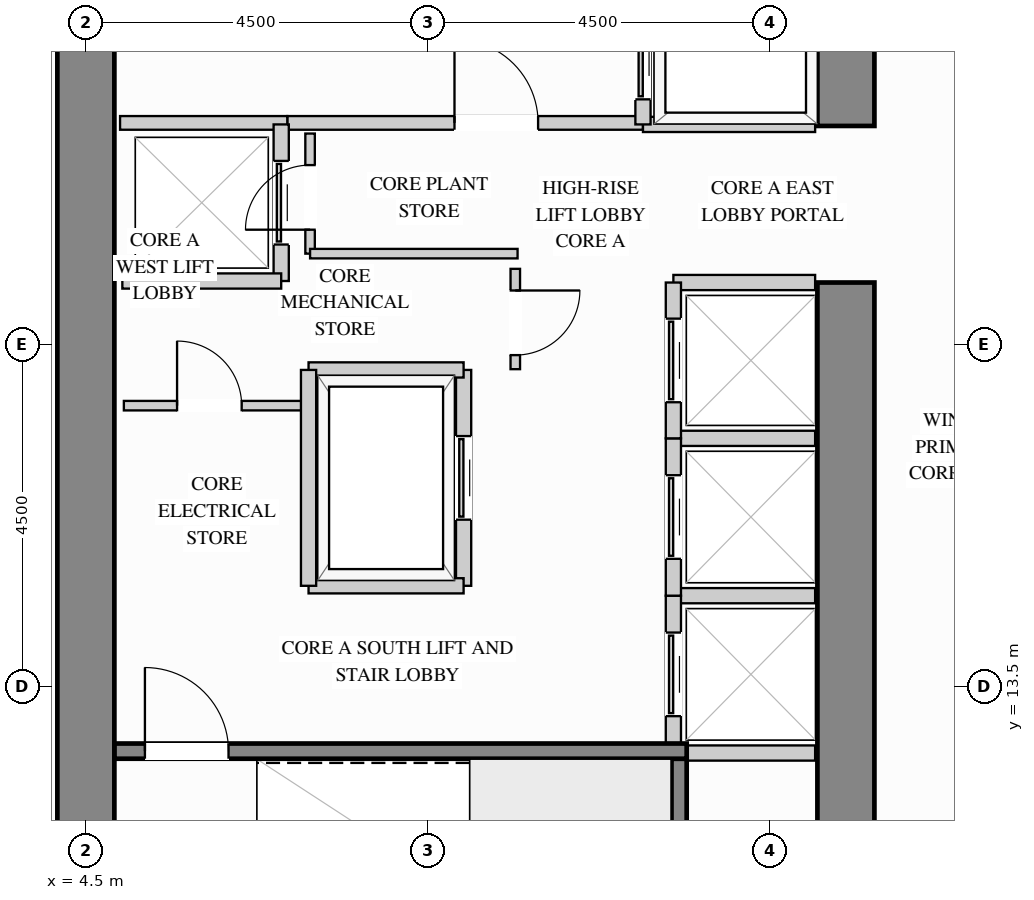
"""IFC4 building model, lengths in metres.
Left out: names, types, materials, properties, quantities, classifications, styles, units other than length and angle.
Written with IfcOpenShell. Run it as: python <this file> out.ifc"""

import sys

from ifc_helpers import new_model, si_unit, direction, frame, frame_2d, origin, place, context, subcontext, project, spatial, rectangle, extrude, source, transform, mapped, element, fill, save


model = new_model("IFC4")
c1 = context("Model", 3, precision=1e-05, world=origin(), true_north=direction((0.0, 1.0)))
c2 = subcontext(c1, "Body", "Model", "MODEL_VIEW")
j1 = project(units=[si_unit("LENGTHUNIT", "METRE"), si_unit("PLANEANGLEUNIT", "RADIAN")], contexts=[c1])
p1 = place(None, origin())
s1 = spatial("IfcSite", under=j1, at=p1, CompositionType="ELEMENT")
p2 = place(p1, origin())
s2 = spatial("IfcBuilding", under=s1, at=p2, CompositionType="ELEMENT")
p3 = place(p2, frame((0.0, 0.0, 88.2)))
s3 = spatial("IfcBuildingStorey", under=s2, at=p3, CompositionType="ELEMENT", Elevation=88.2)
m1 = source(origin(), c2, "Body", "SweptSolid", [
    extrude(rectangle(XDim=9.945, YDim=0.75, at=frame_2d((4.973, 0.0))), origin(), (0.0, 0.0, 1.0), 3.38),
])
p4 = place(p3, frame((14.5, 8.875, 0.0), z_axis=(0.0, 0.0, 1.0), x_axis=(0.0, 1.0, 0.0)))
e1 = element("IfcWall", 1, at=p4, inside=s3, PredefinedType="SHEAR", context=c2, shape_type="MappedRepresentation", body=[
    mapped(m1, transform((0.0, 0.0, 0.0), x_axis=(1.0, 0.0, 0.0), y_axis=(0.0, 1.0, 0.0), z_axis=(0.0, 0.0, 1.0))),
])
m2 = source(origin(), c2, "Body", "SweptSolid", [
    extrude(rectangle(XDim=8.245, YDim=0.75, at=frame_2d((4.123, 0.0))), origin(), (0.0, 0.0, 1.0), 3.38),
])
p5 = place(p3, frame((14.5, 20.88, 0.0), z_axis=(0.0, 0.0, 1.0), x_axis=(0.0, 1.0, 0.0)))
e2 = element("IfcWall", 2, at=p5, inside=s3, PredefinedType="SHEAR", context=c2, shape_type="MappedRepresentation", body=[
    mapped(m2, transform((0.0, 0.0, 0.0), x_axis=(1.0, 0.0, 0.0), y_axis=(0.0, 1.0, 0.0), z_axis=(0.0, 0.0, 1.0))),
])
m3 = source(origin(), c2, "Body", "SweptSolid", [
    extrude(rectangle(XDim=20.25, YDim=0.75, at=frame_2d((10.125, 0.0))), origin(), (0.0, 0.0, 1.0), 3.38),
])
p6 = place(p3, frame((4.5, 8.875, 0.0), z_axis=(0.0, 0.0, 1.0), x_axis=(0.0, 1.0, 0.0)))
e3 = element("IfcWall", 3, at=p6, inside=s3, PredefinedType="SHEAR", context=c2, shape_type="MappedRepresentation", body=[
    mapped(m3, transform((0.0, 0.0, 0.0), x_axis=(1.0, 0.0, 0.0), y_axis=(0.0, 1.0, 0.0), z_axis=(0.0, 0.0, 1.0))),
])
p7 = place(p3, frame((7.15, 20.92, 0.0), z_axis=(0.0, 0.0, 1.0), x_axis=(1.0, 0.0, 0.0)))
e4 = element("IfcWall", 4, at=p7, inside=s3, PredefinedType="PARTITIONING", context=c2, shape_type="SweptSolid", body=[
    extrude(rectangle(XDim=4.68, YDim=0.18, at=frame_2d((2.34, 0.0))), origin(), (0.0, 0.0, 1.0), 3.365),
])
p8 = place(p7, frame((2.2, 0.0, 0.0)))
e5 = element("IfcOpeningElement", 5, at=p8, cuts=e4, PredefinedType="OPENING", context=c2, shape_type="SweptSolid", body=[
    extrude(rectangle(XDim=1.1, YDim=2.15, at=frame_2d((0.55, 1.075))), frame((0.0, 0.1, 0.0), z_axis=(0.0, -1.0, 0.0), x_axis=(1.0, 0.0, 0.0)), (0.0, 0.0, 1.0), 0.2),
])
m4 = source(origin(), c2, "Body", "SweptSolid", [
    extrude(rectangle(XDim=2.2, YDim=0.18, at=frame_2d((1.1, 0.0))), origin(), (0.0, 0.0, 1.0), 3.365),
])
p9 = place(p3, frame((4.95, 20.92, 0.0), z_axis=(0.0, 0.0, 1.0), x_axis=(1.0, 0.0, 0.0)))
e6 = element("IfcWall", 6, at=p9, inside=s3, PredefinedType="PARTITIONING", context=c2, shape_type="MappedRepresentation", body=[
    mapped(m4, transform((0.0, 0.0, 0.0), x_axis=(1.0, 0.0, 0.0), y_axis=(0.0, 1.0, 0.0), z_axis=(0.0, 0.0, 1.0))),
])
p10 = place(p3, frame((10.15, 17.68, 0.0), z_axis=(0.0, 0.0, 1.0), x_axis=(0.0, 1.0, 0.0)))
e7 = element("IfcWall", 7, at=p10, inside=s3, PredefinedType="PARTITIONING", context=c2, shape_type="SweptSolid", body=[
    extrude(rectangle(XDim=1.32, YDim=0.125, at=frame_2d((0.66, 0.0))), origin(), (0.0, 0.0, 1.0), 3.365),
])
p11 = place(p10, frame((0.185, 0.0, 0.0)))
e8 = element("IfcOpeningElement", 8, at=p11, cuts=e7, PredefinedType="OPENING", context=c2, shape_type="SweptSolid", body=[
    extrude(rectangle(XDim=0.85, YDim=2.1, at=frame_2d((0.425, 1.05))), frame((0.0, 0.073, 0.0), z_axis=(0.0, -1.0, 0.0), x_axis=(1.0, 0.0, 0.0)), (0.0, 0.0, 1.0), 0.145),
])
p12 = place(p3, frame((7.45, 19.2, 0.0), z_axis=(0.0, 0.0, 1.0), x_axis=(0.0, 1.0, 0.0)))
e9 = element("IfcWall", 9, at=p12, inside=s3, PredefinedType="PARTITIONING", context=c2, shape_type="SweptSolid", body=[
    extrude(rectangle(XDim=1.58, YDim=0.125, at=frame_2d((0.79, 0.0))), origin(), (0.0, 0.0, 1.0), 3.365),
])
p13 = place(p12, frame((0.315, 0.0, 0.0)))
e10 = element("IfcOpeningElement", 10, at=p13, cuts=e9, PredefinedType="OPENING", context=c2, shape_type="SweptSolid", body=[
    extrude(rectangle(XDim=0.85, YDim=2.1, at=frame_2d((0.425, 1.05))), frame((0.0, 0.073, 0.0), z_axis=(0.0, -1.0, 0.0), x_axis=(1.0, 0.0, 0.0)), (0.0, 0.0, 1.0), 0.145),
])
m5 = source(origin(), c2, "Body", "SweptSolid", [
    extrude(rectangle(XDim=2.73, YDim=0.125, at=frame_2d((1.365, 0.0))), origin(), (0.0, 0.0, 1.0), 3.365),
])
p14 = place(p3, frame((7.45, 19.2, 0.0), z_axis=(0.0, 0.0, 1.0), x_axis=(1.0, 0.0, 0.0)))
e11 = element("IfcWall", 11, at=p14, inside=s3, PredefinedType="PARTITIONING", context=c2, shape_type="MappedRepresentation", body=[
    mapped(m5, transform((0.0, 0.0, 0.0), x_axis=(1.0, 0.0, 0.0), y_axis=(0.0, 1.0, 0.0), z_axis=(0.0, 0.0, 1.0))),
])
p15 = place(p3, frame((5.0, 17.2, 0.0), z_axis=(0.0, 0.0, 1.0), x_axis=(1.0, 0.0, 0.0)))
e12 = element("IfcWall", 12, at=p15, inside=s3, PredefinedType="PARTITIONING", context=c2, shape_type="SweptSolid", body=[
    extrude(rectangle(XDim=2.4, YDim=0.125, at=frame_2d((1.2, 0.0))), origin(), (0.0, 0.0, 1.0), 3.365),
])
p16 = place(p15, frame((0.7, 0.0, 0.0)))
e13 = element("IfcOpeningElement", 13, at=p16, cuts=e12, PredefinedType="OPENING", context=c2, shape_type="SweptSolid", body=[
    extrude(rectangle(XDim=0.85, YDim=2.1, at=frame_2d((0.425, 1.05))), frame((0.0, 0.073, 0.0), z_axis=(0.0, -1.0, 0.0), x_axis=(1.0, 0.0, 0.0)), (0.0, 0.0, 1.0), 0.145),
])
m6 = source(origin(), c2, "Body", "SweptSolid", [
    extrude(rectangle(XDim=2.265, YDim=0.2, at=frame_2d((1.132, 0.0))), origin(), (0.0, 0.0, 1.0), 3.365),
])
p17 = place(p3, frame((11.83, 20.9, 0.0), z_axis=(0.0, 0.0, 1.0), x_axis=(1.0, 0.0, 0.0)))
e14 = element("IfcWall", 14, at=p17, inside=s3, PredefinedType="PARTITIONING", context=c2, shape_type="MappedRepresentation", body=[
    mapped(m6, transform((0.0, 0.0, 0.0), x_axis=(1.0, 0.0, 0.0), y_axis=(0.0, 1.0, 0.0), z_axis=(0.0, 0.0, 1.0))),
])
p18 = place(p3, frame((11.83, 20.9, 0.0), z_axis=(0.0, 0.0, 1.0), x_axis=(0.0, 1.0, 0.0)))
e15 = element("IfcWall", 15, at=p18, inside=s3, PredefinedType="PARTITIONING", context=c2, shape_type="SweptSolid", body=[
    extrude(rectangle(XDim=1.76, YDim=0.2, at=frame_2d((0.88, 0.0))), origin(), (0.0, 0.0, 1.0), 3.365),
])
p19 = place(p18, frame((0.33, 0.0, 0.0)))
e16 = element("IfcOpeningElement", 16, at=p19, cuts=e15, PredefinedType="OPENING", context=c2, shape_type="SweptSolid", body=[
    extrude(rectangle(XDim=1.1, YDim=2.2, at=frame_2d((0.55, 1.1))), frame((0.0, 0.11, 0.0), z_axis=(0.0, -1.0, 0.0), x_axis=(1.0, 0.0, 0.0)), (0.0, 0.0, 1.0), 0.22),
])
m7 = source(origin(), c2, "Body", "SweptSolid", [
    extrude(rectangle(XDim=1.865, YDim=0.2, at=frame_2d((0.933, 0.0))), origin(), (0.0, 0.0, 1.0), 3.365),
])
for number, where, z_axis, x_axis in (
    (17, (12.23, 14.7, 0.0), (0.0, 0.0, 1.0), (1.0, 0.0, 0.0)),
    (18, (12.23, 12.63, 0.0), (0.0, 0.0, 1.0), (1.0, 0.0, 0.0)),
):
    element("IfcWall", number, at=place(p3, frame(where, z_axis=z_axis, x_axis=x_axis)), inside=s3, PredefinedType="PARTITIONING", context=c2, shape_type="MappedRepresentation", body=[
        mapped(m7, transform((0.0, 0.0, 0.0), x_axis=(1.0, 0.0, 0.0), y_axis=(0.0, 1.0, 0.0), z_axis=(0.0, 0.0, 1.0))),
    ])
p20 = place(p3, frame((12.23, 12.63, 0.0), z_axis=(0.0, 0.0, 1.0), x_axis=(0.0, 1.0, 0.0)))
e19 = element("IfcWall", 19, at=p20, inside=s3, PredefinedType="PARTITIONING", context=c2, shape_type="SweptSolid", body=[
    extrude(rectangle(XDim=2.07, YDim=0.2, at=frame_2d((1.035, 0.0))), origin(), (0.0, 0.0, 1.0), 3.365),
])
p21 = place(p20, frame((0.485, 0.0, 0.0)))
e20 = element("IfcOpeningElement", 20, at=p21, cuts=e19, PredefinedType="OPENING", context=c2, shape_type="SweptSolid", body=[
    extrude(rectangle(XDim=1.1, YDim=2.2, at=frame_2d((0.55, 1.1))), frame((0.0, 0.11, 0.0), z_axis=(0.0, -1.0, 0.0), x_axis=(1.0, 0.0, 0.0)), (0.0, 0.0, 1.0), 0.22),
])
p22 = place(p3, frame((12.23, 16.77, 0.0), z_axis=(0.0, 0.0, 1.0), x_axis=(1.0, 0.0, 0.0)))
e21 = element("IfcWall", 21, at=p22, inside=s3, PredefinedType="PARTITIONING", context=c2, shape_type="MappedRepresentation", body=[
    mapped(m7, transform((0.0, 0.0, 0.0), x_axis=(1.0, 0.0, 0.0), y_axis=(0.0, 1.0, 0.0), z_axis=(0.0, 0.0, 1.0))),
])
p23 = place(p3, frame((12.23, 14.7, 0.0), z_axis=(0.0, 0.0, 1.0), x_axis=(0.0, 1.0, 0.0)))
e22 = element("IfcWall", 22, at=p23, inside=s3, PredefinedType="PARTITIONING", context=c2, shape_type="SweptSolid", body=[
    extrude(rectangle(XDim=2.07, YDim=0.2, at=frame_2d((1.035, 0.0))), origin(), (0.0, 0.0, 1.0), 3.365),
])
p24 = place(p23, frame((0.485, 0.0, 0.0)))
e23 = element("IfcOpeningElement", 23, at=p24, cuts=e22, PredefinedType="OPENING", context=c2, shape_type="SweptSolid", body=[
    extrude(rectangle(XDim=1.1, YDim=2.2, at=frame_2d((0.55, 1.1))), frame((0.0, 0.11, 0.0), z_axis=(0.0, -1.0, 0.0), x_axis=(1.0, 0.0, 0.0)), (0.0, 0.0, 1.0), 0.22),
])
p25 = place(p3, frame((12.23, 18.82, 0.0), z_axis=(0.0, 0.0, 1.0), x_axis=(1.0, 0.0, 0.0)))
e24 = element("IfcWall", 24, at=p25, inside=s3, PredefinedType="PARTITIONING", context=c2, shape_type="MappedRepresentation", body=[
    mapped(m7, transform((0.0, 0.0, 0.0), x_axis=(1.0, 0.0, 0.0), y_axis=(0.0, 1.0, 0.0), z_axis=(0.0, 0.0, 1.0))),
])
p26 = place(p3, frame((12.23, 16.77, 0.0), z_axis=(0.0, 0.0, 1.0), x_axis=(0.0, 1.0, 0.0)))
e25 = element("IfcWall", 25, at=p26, inside=s3, PredefinedType="PARTITIONING", context=c2, shape_type="SweptSolid", body=[
    extrude(rectangle(XDim=2.05, YDim=0.2, at=frame_2d((1.025, 0.0))), origin(), (0.0, 0.0, 1.0), 3.365),
])
p27 = place(p26, frame((0.475, 0.0, 0.0)))
e26 = element("IfcOpeningElement", 26, at=p27, cuts=e25, PredefinedType="OPENING", context=c2, shape_type="SweptSolid", body=[
    extrude(rectangle(XDim=1.1, YDim=2.2, at=frame_2d((0.55, 1.1))), frame((0.0, 0.11, 0.0), z_axis=(0.0, -1.0, 0.0), x_axis=(1.0, 0.0, 0.0)), (0.0, 0.0, 1.0), 0.22),
])
p28 = place(p3, frame((7.07, 18.84, 0.0), z_axis=(0.0, 0.0, 1.0), x_axis=(0.0, 1.0, 0.0)))
e27 = element("IfcWall", 27, at=p28, inside=s3, PredefinedType="PARTITIONING", context=c2, shape_type="SweptSolid", body=[
    extrude(rectangle(XDim=2.06, YDim=0.2, at=frame_2d((1.03, 0.0))), origin(), (0.0, 0.0, 1.0), 3.365),
])
p29 = place(p28, frame((0.48, 0.0, 0.0)))
e28 = element("IfcOpeningElement", 28, at=p29, cuts=e27, PredefinedType="OPENING", context=c2, shape_type="SweptSolid", body=[
    extrude(rectangle(XDim=1.1, YDim=2.2, at=frame_2d((0.55, 1.1))), frame((0.0, 0.11, 0.0), z_axis=(0.0, -1.0, 0.0), x_axis=(1.0, 0.0, 0.0)), (0.0, 0.0, 1.0), 0.22),
])
m8 = source(origin(), c2, "Body", "SweptSolid", [
    extrude(rectangle(XDim=2.09, YDim=0.2, at=frame_2d((1.045, 0.0))), origin(), (0.0, 0.0, 1.0), 3.365),
])
p30 = place(p3, frame((4.98, 18.84, 0.0), z_axis=(0.0, 0.0, 1.0), x_axis=(1.0, 0.0, 0.0)))
e29 = element("IfcWall", 29, at=p30, inside=s3, PredefinedType="PARTITIONING", context=c2, shape_type="MappedRepresentation", body=[
    mapped(m8, transform((0.0, 0.0, 0.0), x_axis=(1.0, 0.0, 0.0), y_axis=(0.0, 1.0, 0.0), z_axis=(0.0, 0.0, 1.0))),
])
p31 = place(p3, frame((9.47, 14.83, 0.0), z_axis=(0.0, 0.0, 1.0), x_axis=(0.0, 1.0, 0.0)))
e30 = element("IfcWall", 30, at=p31, inside=s3, PredefinedType="PARTITIONING", context=c2, shape_type="SweptSolid", body=[
    extrude(rectangle(XDim=2.84, YDim=0.2, at=frame_2d((1.42, 0.0))), origin(), (0.0, 0.0, 1.0), 3.365),
])
p32 = place(p31, frame((0.87, 0.0, 0.0)))
e31 = element("IfcOpeningElement", 31, at=p32, cuts=e30, PredefinedType="OPENING", context=c2, shape_type="SweptSolid", body=[
    extrude(rectangle(XDim=1.1, YDim=2.2, at=frame_2d((0.55, 1.1))), frame((0.0, 0.11, 0.0), z_axis=(0.0, -1.0, 0.0), x_axis=(1.0, 0.0, 0.0)), (0.0, 0.0, 1.0), 0.22),
])
m9 = source(origin(), c2, "Body", "SweptSolid", [
    extrude(rectangle(XDim=2.04, YDim=0.2, at=frame_2d((1.02, 0.0))), origin(), (0.0, 0.0, 1.0), 3.365),
])
for number, where, z_axis, x_axis in (
    (32, (7.43, 17.67, 0.0), (0.0, 0.0, 1.0), (1.0, 0.0, 0.0)),
    (33, (7.43, 14.83, 0.0), (0.0, 0.0, 1.0), (1.0, 0.0, 0.0)),
):
    element("IfcWall", number, at=place(p3, frame(where, z_axis=z_axis, x_axis=x_axis)), inside=s3, PredefinedType="PARTITIONING", context=c2, shape_type="MappedRepresentation", body=[
        mapped(m9, transform((0.0, 0.0, 0.0), x_axis=(1.0, 0.0, 0.0), y_axis=(0.0, 1.0, 0.0), z_axis=(0.0, 0.0, 1.0))),
    ])
m10 = source(origin(), c2, "Body", "SweptSolid", [
    extrude(rectangle(XDim=2.84, YDim=0.2, at=frame_2d((1.42, 0.0))), origin(), (0.0, 0.0, 1.0), 3.365),
])
p33 = place(p3, frame((7.43, 14.83, 0.0), z_axis=(0.0, 0.0, 1.0), x_axis=(0.0, 1.0, 0.0)))
e34 = element("IfcWall", 34, at=p33, inside=s3, PredefinedType="PARTITIONING", context=c2, shape_type="MappedRepresentation", body=[
    mapped(m10, transform((0.0, 0.0, 0.0), x_axis=(1.0, 0.0, 0.0), y_axis=(0.0, 1.0, 0.0), z_axis=(0.0, 0.0, 1.0))),
])
m11 = source(origin(), c2, "Body", "SweptSolid", [
    extrude(rectangle(XDim=3.678, YDim=0.2, at=frame_2d((1.839, 0.0))), origin(), (0.0, 0.0, 1.0), 3.38),
])
p34 = place(p3, frame((12.305, 8.877, 0.0), z_axis=(0.0, 0.0, 1.0), x_axis=(0.0, 1.0, 0.0)))
e35 = element("IfcWall", 35, at=p34, inside=s3, PredefinedType="SHEAR", context=c2, shape_type="MappedRepresentation", body=[
    mapped(m11, transform((0.0, 0.0, 0.0), x_axis=(1.0, 0.0, 0.0), y_axis=(0.0, 1.0, 0.0), z_axis=(0.0, 0.0, 1.0))),
])
p35 = place(p3, frame((4.877, 12.655, 0.0), z_axis=(0.0, 0.0, 1.0), x_axis=(1.0, 0.0, 0.0)))
e36 = element("IfcWall", 36, at=p35, inside=s3, PredefinedType="SHEAR", context=c2, shape_type="SweptSolid", body=[
    extrude(rectangle(XDim=7.528, YDim=0.2, at=frame_2d((3.764, 0.0))), origin(), (0.0, 0.0, 1.0), 3.38),
])
p36 = place(p35, frame((0.4, 0.0, 0.0)))
e37 = element("IfcOpeningElement", 37, at=p36, cuts=e36, PredefinedType="OPENING", context=c2, shape_type="SweptSolid", body=[
    extrude(rectangle(XDim=1.1, YDim=2.15, at=frame_2d((0.55, 1.075))), frame((0.0, 0.11, 0.0), z_axis=(0.0, -1.0, 0.0), x_axis=(1.0, 0.0, 0.0)), (0.0, 0.0, 1.0), 0.22),
])
m12 = source(origin(), c2, "Body", "SweptSolid", [
    extrude(rectangle(XDim=1.1, YDim=2.15, at=frame_2d((0.55, 1.075))), frame((0.0, 0.025, 0.0), z_axis=(0.0, -1.0, 0.0), x_axis=(1.0, 0.0, 0.0)), (0.0, 0.0, 1.0), 0.05),
])
p37 = place(p8, origin())
e38 = element("IfcDoor", 38, at=p37, inside=s3, OperationType="SINGLE_SWING_LEFT", PredefinedType="DOOR", context=c2, shape_type="MappedRepresentation", body=[
    mapped(m12, transform((0.0, 0.0, 0.0), x_axis=(1.0, 0.0, 0.0), y_axis=(0.0, 1.0, 0.0), z_axis=(0.0, 0.0, 1.0))),
])
fill(e5, e38)
m13 = source(origin(), c2, "Body", "SweptSolid", [
    extrude(rectangle(XDim=1.1, YDim=2.2, at=frame_2d((0.55, 1.1))), frame((0.0, 0.025, 0.0), z_axis=(0.0, -1.0, 0.0), x_axis=(1.0, 0.0, 0.0)), (0.0, 0.0, 1.0), 0.05),
])
p38 = place(p19, origin())
e39 = element("IfcDoor", 39, at=p38, inside=s3, OperationType="SLIDING_TO_LEFT", PredefinedType="DOOR", context=c2, shape_type="MappedRepresentation", body=[
    mapped(m13, transform((0.0, 0.0, 0.0), x_axis=(1.0, 0.0, 0.0), y_axis=(0.0, 1.0, 0.0), z_axis=(0.0, 0.0, 1.0))),
])
fill(e16, e39)
p39 = place(p21, origin())
e40 = element("IfcDoor", 40, at=p39, inside=s3, OperationType="SLIDING_TO_LEFT", PredefinedType="DOOR", context=c2, shape_type="MappedRepresentation", body=[
    mapped(m13, transform((0.0, 0.0, 0.0), x_axis=(1.0, 0.0, 0.0), y_axis=(0.0, 1.0, 0.0), z_axis=(0.0, 0.0, 1.0))),
])
fill(e20, e40)
p40 = place(p24, origin())
e41 = element("IfcDoor", 41, at=p40, inside=s3, OperationType="SLIDING_TO_LEFT", PredefinedType="DOOR", context=c2, shape_type="MappedRepresentation", body=[
    mapped(m13, transform((0.0, 0.0, 0.0), x_axis=(1.0, 0.0, 0.0), y_axis=(0.0, 1.0, 0.0), z_axis=(0.0, 0.0, 1.0))),
])
fill(e23, e41)
p41 = place(p27, origin())
e42 = element("IfcDoor", 42, at=p41, inside=s3, OperationType="SLIDING_TO_LEFT", PredefinedType="DOOR", context=c2, shape_type="MappedRepresentation", body=[
    mapped(m13, transform((0.0, 0.0, 0.0), x_axis=(1.0, 0.0, 0.0), y_axis=(0.0, 1.0, 0.0), z_axis=(0.0, 0.0, 1.0))),
])
fill(e26, e42)
p42 = place(p29, origin())
e43 = element("IfcDoor", 43, at=p42, inside=s3, OperationType="SLIDING_TO_LEFT", PredefinedType="DOOR", context=c2, shape_type="MappedRepresentation", body=[
    mapped(m13, transform((0.0, 0.0, 0.0), x_axis=(1.0, 0.0, 0.0), y_axis=(0.0, 1.0, 0.0), z_axis=(0.0, 0.0, 1.0))),
])
fill(e28, e43)
p43 = place(p32, origin())
e44 = element("IfcDoor", 44, at=p43, inside=s3, OperationType="SLIDING_TO_LEFT", PredefinedType="DOOR", context=c2, shape_type="MappedRepresentation", body=[
    mapped(m13, transform((0.0, 0.0, 0.0), x_axis=(1.0, 0.0, 0.0), y_axis=(0.0, 1.0, 0.0), z_axis=(0.0, 0.0, 1.0))),
])
fill(e31, e44)
m14 = source(origin(), c2, "Body", "SweptSolid", [
    extrude(rectangle(XDim=0.85, YDim=2.1, at=frame_2d((0.425, 1.05))), frame((0.0, 0.025, 0.0), z_axis=(0.0, -1.0, 0.0), x_axis=(1.0, 0.0, 0.0)), (0.0, 0.0, 1.0), 0.05),
])
p44 = place(p11, origin())
e45 = element("IfcDoor", 45, at=p44, inside=s3, OperationType="SINGLE_SWING_RIGHT", PredefinedType="DOOR", context=c2, shape_type="MappedRepresentation", body=[
    mapped(m14, transform((0.0, 0.0, 0.0), x_axis=(1.0, 0.0, 0.0), y_axis=(0.0, 1.0, 0.0), z_axis=(0.0, 0.0, 1.0))),
])
fill(e8, e45)
p45 = place(p16, origin())
e46 = element("IfcDoor", 46, at=p45, inside=s3, OperationType="SINGLE_SWING_LEFT", PredefinedType="DOOR", context=c2, shape_type="MappedRepresentation", body=[
    mapped(m14, transform((0.0, 0.0, 0.0), x_axis=(1.0, 0.0, 0.0), y_axis=(0.0, 1.0, 0.0), z_axis=(0.0, 0.0, 1.0))),
])
fill(e13, e46)
p46 = place(p13, origin())
e47 = element("IfcDoor", 47, at=p46, inside=s3, OperationType="SINGLE_SWING_LEFT", PredefinedType="DOOR", context=c2, shape_type="MappedRepresentation", body=[
    mapped(m14, transform((0.0, 0.0, 0.0), x_axis=(1.0, 0.0, 0.0), y_axis=(0.0, 1.0, 0.0), z_axis=(0.0, 0.0, 1.0))),
])
fill(e10, e47)
m15 = source(origin(), c2, "Body", "SweptSolid", [
    extrude(rectangle(XDim=1.1, YDim=2.15, at=frame_2d((0.55, 1.075))), frame((0.0, 0.025, 0.0), z_axis=(0.0, -1.0, 0.0), x_axis=(1.0, 0.0, 0.0)), (0.0, 0.0, 1.0), 0.05),
])
p47 = place(p36, origin())
e48 = element("IfcDoor", 48, at=p47, inside=s3, OperationType="SINGLE_SWING_LEFT", PredefinedType="DOOR", context=c2, shape_type="MappedRepresentation", body=[
    mapped(m15, transform((0.0, 0.0, 0.0), x_axis=(1.0, 0.0, 0.0), y_axis=(0.0, 1.0, 0.0), z_axis=(0.0, 0.0, 1.0))),
])
fill(e37, e48)
save(model, sys.argv[1])
